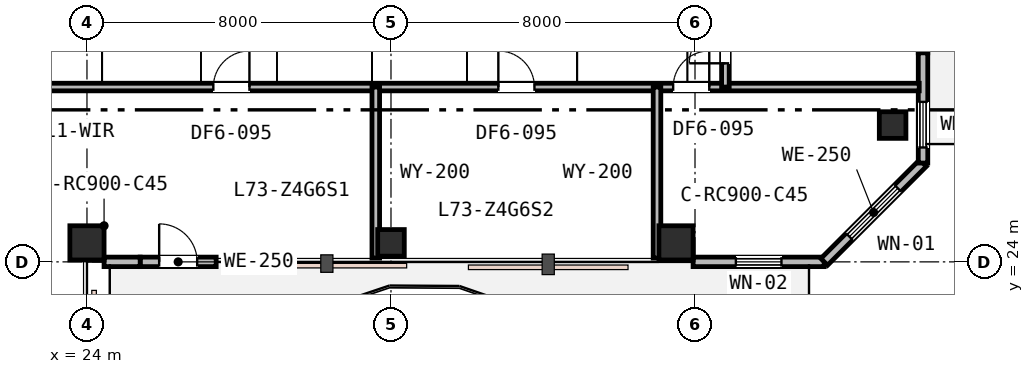
"""IFC4 building model, lengths in metres.
Left out: names, types, materials, properties, quantities, classifications, styles, units other than length and angle.
Written with IfcOpenShell. Run it as: python <this file> out.ifc"""

import sys

from ifc_helpers import new_model, si_unit, direction, frame, frame_2d, origin, origin_2d, place, context, subcontext, project, spatial, rectangle, extrude, element, fill, save


model = new_model("IFC4")
c1 = context("Model", 3, precision=1e-05, world=origin(), true_north=direction((0.0, 1.0)))
c2 = subcontext(c1, "Body", "Model", "MODEL_VIEW")
j1 = project(units=[si_unit("LENGTHUNIT", "METRE"), si_unit("PLANEANGLEUNIT", "RADIAN")], contexts=[c1])
p1 = place(None, origin())
s1 = spatial("IfcSite", under=j1, at=p1, CompositionType="ELEMENT")
p2 = place(p1, origin())
s2 = spatial("IfcBuilding", under=s1, at=p2, CompositionType="ELEMENT")
p3 = place(p2, frame((0.0, 0.0, 283.0)))
s3 = spatial("IfcBuildingStorey", under=s2, at=p3, CompositionType="ELEMENT", Elevation=283.0)
p4 = place(p3, frame((24.0, 24.5, 0.0), z_axis=(0.0, 0.0, 1.0), x_axis=(1.0, 0.0, 0.0)))
e1 = element("IfcColumn", 1, at=p4, inside=s3, PredefinedType="COLUMN", context=c2, shape_type="SweptSolid", body=[
    extrude(rectangle(XDim=0.9, YDim=0.9, at=origin_2d()), origin(), (0.0, 0.0, 1.0), 3.8),
])
p5 = place(p3, frame((32.0, 24.5, 0.0), z_axis=(0.0, 0.0, 1.0), x_axis=(1.0, 0.0, 0.0)))
e2 = element("IfcColumn", 2, at=p5, inside=s3, PredefinedType="COLUMN", context=c2, shape_type="SweptSolid", body=[
    extrude(rectangle(XDim=0.7, YDim=0.7, at=origin_2d()), origin(), (0.0, 0.0, 1.0), 3.8),
])
p6 = place(p3, frame((39.5, 24.5, 0.0), z_axis=(0.0, 0.0, 1.0), x_axis=(1.0, 0.0, 0.0)))
e3 = element("IfcColumn", 3, at=p6, inside=s3, PredefinedType="COLUMN", context=c2, shape_type="SweptSolid", body=[
    extrude(rectangle(XDim=0.9, YDim=0.9, at=origin_2d()), origin(), (0.0, 0.0, 1.0), 3.8),
])
p7 = place(p3, frame((45.2, 27.6, 0.0), z_axis=(0.0, 0.0, 1.0), x_axis=(1.0, 0.0, 0.0)))
e4 = element("IfcColumn", 4, at=p7, inside=s3, PredefinedType="COLUMN", context=c2, shape_type="SweptSolid", body=[
    extrude(rectangle(XDim=0.7, YDim=0.7, at=origin_2d()), origin(), (0.0, 0.0, 1.0), 3.8),
])
p8 = place(p3, frame((25.4, 24.0, 0.0), z_axis=(0.0, 0.0, 1.0), x_axis=(1.0, 0.0, 0.0)))
e5 = element("IfcWall", 5, at=p8, inside=s3, PredefinedType="STANDARD", context=c2, shape_type="SweptSolid", body=[
    extrude(rectangle(XDim=2.0, YDim=0.25, at=frame_2d((1.0, 0.0))), origin(), (0.0, 0.0, 1.0), 3.28),
])
p9 = place(p8, frame((0.5, 0.0, 0.0)))
e6 = element("IfcOpeningElement", 6, at=p9, cuts=e5, PredefinedType="OPENING", context=c2, shape_type="SweptSolid", body=[
    extrude(rectangle(XDim=1.0, YDim=2.15, at=frame_2d((0.5, 1.075))), frame((0.0, 0.135, 0.0), z_axis=(0.0, -1.0, 0.0), x_axis=(1.0, 0.0, 0.0)), (0.0, 0.0, 1.0), 0.27),
])
p10 = place(p3, frame((24.45, 24.0, 0.0), z_axis=(0.0, 0.0, 1.0), x_axis=(1.0, 0.0, 0.0)))
e7 = element("IfcWall", 7, at=p10, inside=s3, PredefinedType="STANDARD", context=c2, shape_type="SweptSolid", body=[
    extrude(rectangle(XDim=0.95, YDim=0.25, at=frame_2d((0.475, 0.0))), origin(), (0.0, 0.0, 1.0), 3.28),
])
p11 = place(p3, frame((39.95, 24.0, 0.0), z_axis=(0.0, 0.0, 1.0), x_axis=(1.0, 0.0, 0.0)))
e8 = element("IfcWall", 8, at=p11, inside=s3, PredefinedType="STANDARD", context=c2, shape_type="SweptSolid", body=[
    extrude(rectangle(XDim=3.45, YDim=0.25, at=frame_2d((1.725, 0.0))), origin(), (0.0, 0.0, 1.0), 3.53),
])
p12 = place(p11, frame((1.125, 0.0, 0.85)))
e9 = element("IfcOpeningElement", 9, at=p12, cuts=e8, PredefinedType="OPENING", context=c2, shape_type="SweptSolid", body=[
    extrude(rectangle(XDim=1.2, YDim=1.6, at=frame_2d((0.6, 0.8))), frame((0.0, 0.135, 0.0), z_axis=(0.0, -1.0, 0.0), x_axis=(1.0, 0.0, 0.0)), (0.0, 0.0, 1.0), 0.27),
])
p13 = place(p3, frame((43.4, 24.0, 0.0), z_axis=(0.0, 0.0, 1.0), x_axis=(0.707106781187, 0.707106781187, 0.0)))
e10 = element("IfcWall", 10, at=p13, inside=s3, PredefinedType="STANDARD", context=c2, shape_type="SweptSolid", body=[
    extrude(rectangle(XDim=3.677, YDim=0.25, at=frame_2d((1.839, 0.0))), origin(), (0.0, 0.0, 1.0), 3.53),
])
p14 = place(p13, frame((0.939, 0.0, 0.75)))
e11 = element("IfcOpeningElement", 11, at=p14, cuts=e10, PredefinedType="OPENING", context=c2, shape_type="SweptSolid", body=[
    extrude(rectangle(XDim=1.8, YDim=1.85, at=frame_2d((0.9, 0.925))), frame((0.0, 0.135, 0.0), z_axis=(0.0, -1.0, 0.0), x_axis=(1.0, 0.0, 0.0)), (0.0, 0.0, 1.0), 0.27),
])
p15 = place(p3, frame((46.0, 29.5, 0.0), z_axis=(0.0, 0.0, 1.0), x_axis=(0.0, 1.0, 0.0)))
e12 = element("IfcWall", 12, at=p15, inside=s3, PredefinedType="STANDARD", context=c2, shape_type="SweptSolid", body=[
    extrude(rectangle(XDim=2.0, YDim=0.25, at=frame_2d((1.0, 0.0))), origin(), (0.0, 0.0, 1.0), 3.53),
])
p16 = place(p15, frame((0.5, 0.0, 0.0)))
e13 = element("IfcOpeningElement", 13, at=p16, cuts=e12, PredefinedType="OPENING", context=c2, shape_type="SweptSolid", body=[
    extrude(rectangle(XDim=1.0, YDim=2.15, at=frame_2d((0.5, 1.075))), frame((0.0, 0.135, 0.0), z_axis=(0.0, -1.0, 0.0), x_axis=(1.0, 0.0, 0.0)), (0.0, 0.0, 1.0), 0.27),
])
p17 = place(p3, frame((46.0, 26.6, 0.0), z_axis=(0.0, 0.0, 1.0), x_axis=(0.0, 1.0, 0.0)))
e14 = element("IfcWall", 14, at=p17, inside=s3, PredefinedType="STANDARD", context=c2, shape_type="SweptSolid", body=[
    extrude(rectangle(XDim=2.9, YDim=0.25, at=frame_2d((1.45, 0.0))), origin(), (0.0, 0.0, 1.0), 3.53),
])
p18 = place(p17, frame((0.41, 0.0, 0.85)))
e15 = element("IfcOpeningElement", 15, at=p18, cuts=e14, PredefinedType="OPENING", context=c2, shape_type="SweptSolid", body=[
    extrude(rectangle(XDim=1.2, YDim=1.6, at=frame_2d((0.6, 0.8))), frame((0.0, 0.135, 0.0), z_axis=(0.0, -1.0, 0.0), x_axis=(1.0, 0.0, 0.0)), (0.0, 0.0, 1.0), 0.27),
])
p19 = place(p3, frame((21.8, 28.6, 0.0), z_axis=(0.0, 0.0, 1.0), x_axis=(1.0, 0.0, 0.0)))
e16 = element("IfcWall", 16, at=p19, inside=s3, PredefinedType="PARTITIONING", context=c2, shape_type="SweptSolid", body=[
    extrude(rectangle(XDim=24.1, YDim=0.2, at=frame_2d((12.05, 0.0))), origin(), (0.0, 0.0, 1.0), 3.24),
])
p20 = place(p19, frame((5.525, 0.0, 0.0)))
e17 = element("IfcOpeningElement", 17, at=p20, cuts=e16, PredefinedType="OPENING", context=c2, shape_type="SweptSolid", body=[
    extrude(rectangle(XDim=0.95, YDim=2.15, at=frame_2d((0.475, 1.075))), frame((0.0, 0.11, 0.0), z_axis=(0.0, -1.0, 0.0), x_axis=(1.0, 0.0, 0.0)), (0.0, 0.0, 1.0), 0.22),
])
p21 = place(p19, frame((13.025, 0.0, 0.0)))
e18 = element("IfcOpeningElement", 18, at=p21, cuts=e16, PredefinedType="OPENING", context=c2, shape_type="SweptSolid", body=[
    extrude(rectangle(XDim=0.95, YDim=2.15, at=frame_2d((0.475, 1.075))), frame((0.0, 0.11, 0.0), z_axis=(0.0, -1.0, 0.0), x_axis=(1.0, 0.0, 0.0)), (0.0, 0.0, 1.0), 0.22),
])
p22 = place(p19, frame((17.625, 0.0, 0.0)))
e19 = element("IfcOpeningElement", 19, at=p22, cuts=e16, PredefinedType="OPENING", context=c2, shape_type="SweptSolid", body=[
    extrude(rectangle(XDim=0.95, YDim=2.15, at=frame_2d((0.475, 1.075))), frame((0.0, 0.11, 0.0), z_axis=(0.0, -1.0, 0.0), x_axis=(1.0, 0.0, 0.0)), (0.0, 0.0, 1.0), 0.22),
])
p23 = place(p3, frame((40.8, 28.6, 0.0), z_axis=(0.0, 0.0, 1.0), x_axis=(0.0, 1.0, 0.0)))
e20 = element("IfcWall", 20, at=p23, inside=s3, PredefinedType="PARTITIONING", context=c2, shape_type="SweptSolid", body=[
    extrude(rectangle(XDim=14.3, YDim=0.2, at=frame_2d((7.15, 0.0))), origin(), (0.0, 0.0, 1.0), 3.24),
])
p24 = place(p23, frame((0.625, 0.0, 0.0)))
e21 = element("IfcOpeningElement", 21, at=p24, cuts=e20, PredefinedType="OPENING", context=c2, shape_type="SweptSolid", body=[
    extrude(rectangle(XDim=0.95, YDim=2.15, at=frame_2d((0.475, 1.075))), frame((0.0, 0.11, 0.0), z_axis=(0.0, -1.0, 0.0), x_axis=(1.0, 0.0, 0.0)), (0.0, 0.0, 1.0), 0.22),
])
for number, where, z_axis, x_axis in (
    (22, (31.6, 24.1, 0.0), (0.0, 0.0, 1.0), (0.0, 1.0, 0.0)),
    (23, (39.0, 24.1, 0.0), (0.0, 0.0, 1.0), (0.0, 1.0, 0.0)),
):
    element("IfcWall", number, at=place(p3, frame(where, z_axis=z_axis, x_axis=x_axis)), inside=s3, PredefinedType="PARTITIONING", context=c2, shape_type="SweptSolid", body=[
        extrude(rectangle(XDim=4.5, YDim=0.2, at=frame_2d((2.25, 0.0))), origin(), (0.0, 0.0, 1.0), 3.24),
    ])
p25 = place(p9, origin())
e24 = element("IfcDoor", 24, at=p25, inside=s3, OperationType="SINGLE_SWING_LEFT", PredefinedType="DOOR", context=c2, shape_type="SweptSolid", body=[
    extrude(rectangle(XDim=1.0, YDim=2.15, at=frame_2d((0.5, 1.075))), frame((0.0, 0.025, 0.0), z_axis=(0.0, -1.0, 0.0), x_axis=(1.0, 0.0, 0.0)), (0.0, 0.0, 1.0), 0.05),
])
fill(e6, e24)
p26 = place(p12, origin())
e25 = element("IfcWindow", 25, at=p26, inside=s3, PartitioningType="SINGLE_PANEL", PredefinedType="WINDOW", context=c2, shape_type="SweptSolid", body=[
    extrude(rectangle(XDim=1.2, YDim=1.6, at=frame_2d((0.6, 0.8))), frame((0.0, 0.03, 0.0), z_axis=(0.0, -1.0, 0.0), x_axis=(1.0, 0.0, 0.0)), (0.0, 0.0, 1.0), 0.06),
])
fill(e9, e25)
p27 = place(p14, origin())
e26 = element("IfcWindow", 26, at=p27, inside=s3, PartitioningType="SINGLE_PANEL", PredefinedType="WINDOW", context=c2, shape_type="SweptSolid", body=[
    extrude(rectangle(XDim=1.8, YDim=1.85, at=frame_2d((0.9, 0.925))), frame((0.0, 0.03, 0.0), z_axis=(0.0, -1.0, 0.0), x_axis=(1.0, 0.0, 0.0)), (0.0, 0.0, 1.0), 0.06),
])
fill(e11, e26)
p28 = place(p18, origin())
e27 = element("IfcWindow", 27, at=p28, inside=s3, PartitioningType="SINGLE_PANEL", PredefinedType="WINDOW", context=c2, shape_type="SweptSolid", body=[
    extrude(rectangle(XDim=1.2, YDim=1.6, at=frame_2d((0.6, 0.8))), frame((0.0, 0.03, 0.0), z_axis=(0.0, -1.0, 0.0), x_axis=(1.0, 0.0, 0.0)), (0.0, 0.0, 1.0), 0.06),
])
fill(e15, e27)
p29 = place(p24, origin())
e28 = element("IfcDoor", 28, at=p29, inside=s3, OperationType="SINGLE_SWING_LEFT", PredefinedType="DOOR", context=c2, shape_type="SweptSolid", body=[
    extrude(rectangle(XDim=0.95, YDim=2.15, at=frame_2d((0.475, 1.075))), frame((0.0, 0.025, 0.0), z_axis=(0.0, -1.0, 0.0), x_axis=(1.0, 0.0, 0.0)), (0.0, 0.0, 1.0), 0.05),
])
fill(e21, e28)
p30 = place(p20, origin())
e29 = element("IfcDoor", 29, at=p30, inside=s3, OperationType="SINGLE_SWING_RIGHT", PredefinedType="DOOR", context=c2, shape_type="SweptSolid", body=[
    extrude(rectangle(XDim=0.95, YDim=2.15, at=frame_2d((0.475, 1.075))), frame((0.0, 0.025, 0.0), z_axis=(0.0, -1.0, 0.0), x_axis=(1.0, 0.0, 0.0)), (0.0, 0.0, 1.0), 0.05),
])
fill(e17, e29)
p31 = place(p21, origin())
e30 = element("IfcDoor", 30, at=p31, inside=s3, OperationType="SINGLE_SWING_LEFT", PredefinedType="DOOR", context=c2, shape_type="SweptSolid", body=[
    extrude(rectangle(XDim=0.95, YDim=2.15, at=frame_2d((0.475, 1.075))), frame((0.0, 0.025, 0.0), z_axis=(0.0, -1.0, 0.0), x_axis=(1.0, 0.0, 0.0)), (0.0, 0.0, 1.0), 0.05),
])
fill(e18, e30)
p32 = place(p22, origin())
e31 = element("IfcDoor", 31, at=p32, inside=s3, OperationType="SINGLE_SWING_RIGHT", PredefinedType="DOOR", context=c2, shape_type="SweptSolid", body=[
    extrude(rectangle(XDim=0.95, YDim=2.15, at=frame_2d((0.475, 1.075))), frame((0.0, 0.025, 0.0), z_axis=(0.0, -1.0, 0.0), x_axis=(1.0, 0.0, 0.0)), (0.0, 0.0, 1.0), 0.05),
])
fill(e19, e31)
save(model, sys.argv[1])
